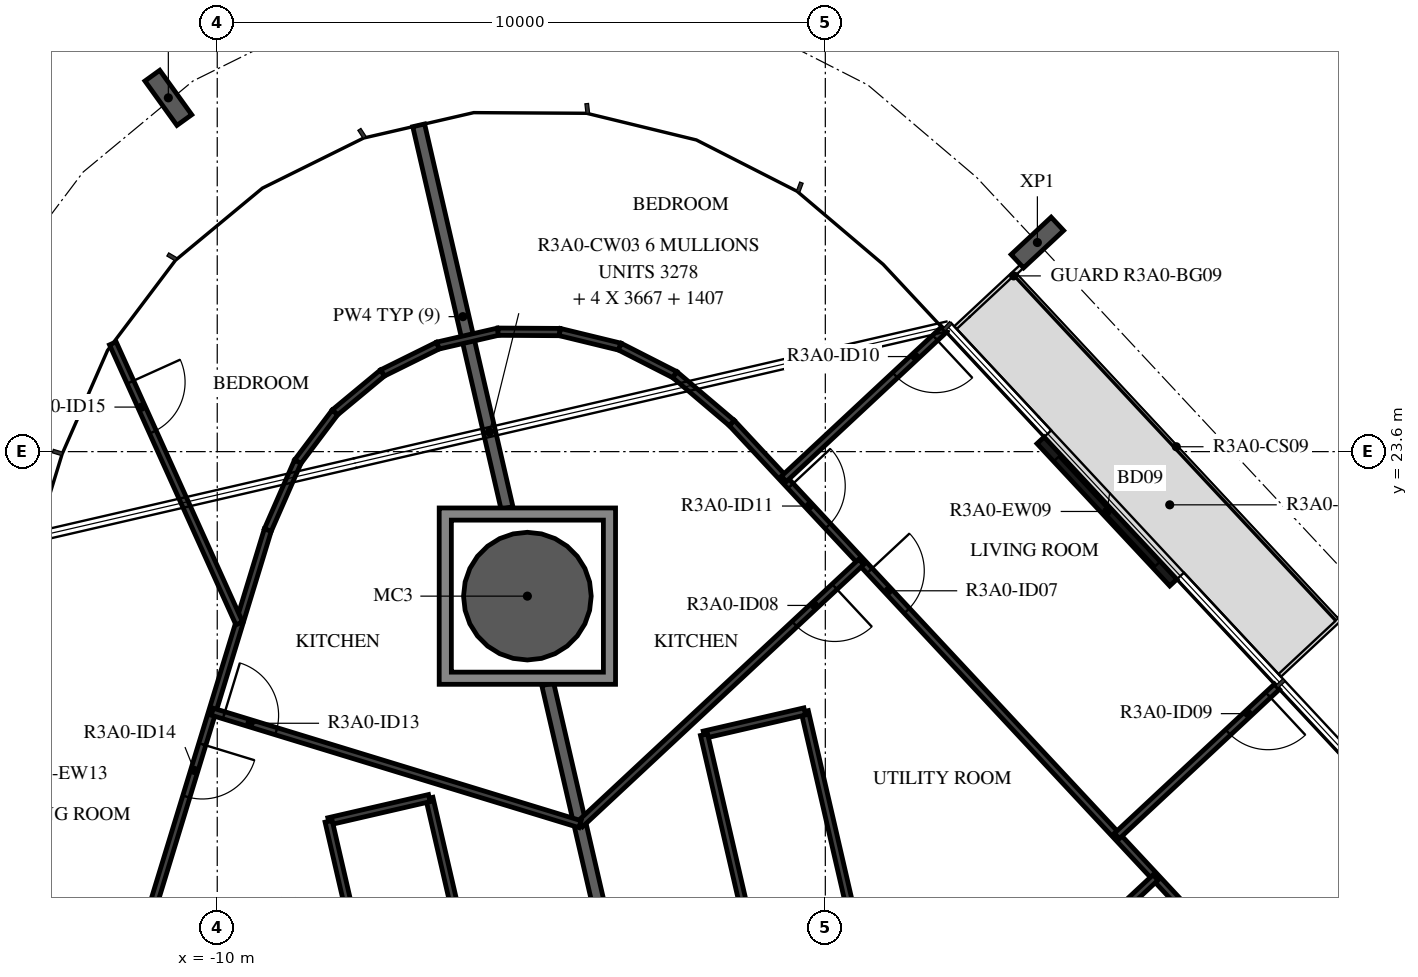
"""IFC4 building model, lengths in metres.
Left out: names, types, materials, properties, quantities, classifications, styles, units other than length and angle.
Written with IfcOpenShell. Run it as: python <this file> out.ifc"""

import sys

from ifc_helpers import new_model, si_unit, direction, frame, frame_2d, origin, origin_2d, place, context, subcontext, project, spatial, polyline, rectangle, hollow_circle, i_section, outline, extrude, element, fill, save


model = new_model("IFC4")
c1 = context("Model", 3, precision=1e-05, world=origin(), true_north=direction((0.0, 1.0)))
c2 = subcontext(c1, "Body", "Model", "MODEL_VIEW")
j1 = project(units=[si_unit("LENGTHUNIT", "METRE"), si_unit("PLANEANGLEUNIT", "RADIAN")], contexts=[c1])
p1 = place(None, origin())
s1 = spatial("IfcSite", under=j1, at=p1, CompositionType="ELEMENT")
p2 = place(p1, origin())
s2 = spatial("IfcBuilding", under=s1, at=p2, CompositionType="ELEMENT")
p3 = place(p2, frame((0.0, 0.0, 120.4)))
s3 = spatial("IfcBuildingStorey", under=s2, at=p3, CompositionType="ELEMENT", Elevation=120.4)
p4 = place(p3, frame((-4.9, 21.223, -0.38), z_axis=(0.0, 0.0, 1.0), x_axis=(1.0, 0.0, 0.0)))
e1 = element("IfcColumn", 1, at=p4, inside=s3, PredefinedType="COLUMN", context=c2, shape_type="SweptSolid", body=[
    extrude(hollow_circle(Radius=1.05, WallThickness=0.05, at=origin_2d()), origin(), (0.0, 0.0, 1.0), 3.5),
])
for number, where, z_axis, x_axis in (
    (2, (3.487, 27.039, -0.38), (0.0, 0.0, 1.0), (0.682, -0.731, 0.0)),
    (3, (-10.804, 29.418, -0.38), (0.0, 0.0, 1.0), (0.811, 0.585, 0.0)),
):
    element("IfcColumn", number, at=place(p3, frame(where, z_axis=z_axis, x_axis=x_axis)), inside=s3, PredefinedType="COLUMN", context=c2, shape_type="SweptSolid", body=[
        extrude(i_section(OverallWidth=0.3, OverallDepth=0.9, WebThickness=0.019, FlangeThickness=0.035, FilletRadius=0.03, at=origin_2d()), origin(), (0.0, 0.0, 1.0), 3.5),
    ])
p5 = place(p3, frame((5.722, 21.446, 0.0), z_axis=(0.0, 0.0, 1.0), x_axis=(-0.681994703002, 0.731357111866, 0.0)))
e4 = element("IfcWall", 4, at=p5, inside=s3, PredefinedType="STANDARD", context=c2, shape_type="SweptSolid", body=[
    extrude(rectangle(XDim=3.2, YDim=0.16, at=frame_2d((1.6, 0.0))), origin(), (0.0, 0.0, 1.0), 3.12),
])
p6 = place(p5, frame((0.4, 0.0, 0.0)))
e5 = element("IfcOpeningElement", 5, at=p6, cuts=e4, PredefinedType="OPENING", context=c2, shape_type="SweptSolid", body=[
    extrude(rectangle(XDim=2.4, YDim=2.4, at=frame_2d((1.2, 1.2))), frame((0.0, 0.09, 0.0), z_axis=(0.0, -1.0, 0.0), x_axis=(1.0, 0.0, 0.0)), (0.0, 0.0, 1.0), 0.18),
])
p7 = place(p3, frame((-4.565, 19.773, 0.0), z_axis=(0.0, 0.0, 1.0), x_axis=(0.224940633072, -0.974372470667, 0.0)))
e6 = element("IfcWall", 6, at=p7, inside=s3, PredefinedType="STANDARD", context=c2, shape_type="SweptSolid", body=[
    extrude(rectangle(XDim=6.594, YDim=0.2, at=frame_2d((3.297, 0.0))), origin(), (0.0, 0.0, 1.0), 3.12),
])
p8 = place(p3, frame((-6.687, 28.966, 0.0), z_axis=(0.0, 0.0, 1.0), x_axis=(0.224945100086, -0.974371439415, 0.0)))
e7 = element("IfcWall", 7, at=p8, inside=s3, PredefinedType="STANDARD", context=c2, shape_type="SweptSolid", body=[
    extrude(rectangle(XDim=6.458, YDim=0.2, at=frame_2d((3.229, 0.0))), origin(), (0.0, 0.0, 1.0), 3.12),
])
p9 = place(p3, frame((0.496, 15.714, 0.0), z_axis=(0.0, 0.0, 1.0), x_axis=(-0.224960478174, 0.974367889075, 0.0)))
e8 = element("IfcWall", 8, at=p9, inside=s3, PredefinedType="PARTITIONING", context=c2, shape_type="SweptSolid", body=[
    extrude(rectangle(XDim=3.708, YDim=0.12, at=frame_2d((1.854, 0.0))), origin(), (0.0, 0.0, 1.0), 3.12),
])
p10 = place(p3, frame((-0.338, 19.328, 0.0), z_axis=(0.0, 0.0, 1.0), x_axis=(-0.974383934081, -0.224890971374, 0.0)))
e9 = element("IfcWall", 9, at=p10, inside=s3, PredefinedType="PARTITIONING", context=c2, shape_type="SweptSolid", body=[
    extrude(rectangle(XDim=1.7, YDim=0.12, at=frame_2d((0.85, 0.0))), origin(), (0.0, 0.0, 1.0), 3.12),
])
p11 = place(p3, frame((-1.995, 18.945, 0.0), z_axis=(0.0, 0.0, 1.0), x_axis=(0.224946048274, -0.974371220514, 0.0)))
e10 = element("IfcWall", 10, at=p11, inside=s3, PredefinedType="PARTITIONING", context=c2, shape_type="SweptSolid", body=[
    extrude(rectangle(XDim=3.708, YDim=0.12, at=frame_2d((1.854, 0.0))), origin(), (0.0, 0.0, 1.0), 3.12),
])
p12 = place(p3, frame((-1.539, 24.071, 0.0), z_axis=(0.0, 0.0, 1.0), x_axis=(0.68200220595, -0.731350115252, 0.0)))
e11 = element("IfcWall", 11, at=p12, inside=s3, PredefinedType="PARTITIONING", context=c2, shape_type="SweptSolid", body=[
    extrude(rectangle(XDim=17.316, YDim=0.12, at=frame_2d((8.658, 0.0))), origin(), (0.0, 0.0, 1.0), 3.12),
])
p13 = place(p12, frame((3.323, 0.0, 0.0)))
e12 = element("IfcOpeningElement", 12, at=p13, cuts=e11, PredefinedType="OPENING", context=c2, shape_type="SweptSolid", body=[
    extrude(rectangle(XDim=0.9, YDim=2.1, at=frame_2d((0.45, 1.05))), frame((0.0, 0.07, 0.0), z_axis=(0.0, -1.0, 0.0), x_axis=(1.0, 0.0, 0.0)), (0.0, 0.0, 1.0), 0.14),
])
p14 = place(p12, frame((1.417, 0.0, 0.0)))
e13 = element("IfcOpeningElement", 13, at=p14, cuts=e11, PredefinedType="OPENING", context=c2, shape_type="SweptSolid", body=[
    extrude(rectangle(XDim=0.9, YDim=2.1, at=frame_2d((0.45, 1.05))), frame((0.0, 0.07, 0.0), z_axis=(0.0, -1.0, 0.0), x_axis=(1.0, 0.0, 0.0)), (0.0, 0.0, 1.0), 0.14),
])
p15 = place(p3, frame((7.427, 19.734, 0.0), z_axis=(0.0, 0.0, 1.0), x_axis=(-0.73139345201, -0.681955730497, 0.0)))
e14 = element("IfcWall", 14, at=p15, inside=s3, PredefinedType="PARTITIONING", context=c2, shape_type="SweptSolid", body=[
    extrude(rectangle(XDim=3.6, YDim=0.12, at=frame_2d((1.8, 0.0))), origin(), (0.0, 0.0, 1.0), 2.73),
])
p16 = place(p15, frame((0.2, 0.0, 0.0)))
e15 = element("IfcOpeningElement", 15, at=p16, cuts=e14, PredefinedType="OPENING", context=c2, shape_type="SweptSolid", body=[
    extrude(rectangle(XDim=0.9, YDim=2.1, at=frame_2d((0.45, 1.05))), frame((0.0, 0.07, 0.0), z_axis=(0.0, -1.0, 0.0), x_axis=(1.0, 0.0, 0.0)), (0.0, 0.0, 1.0), 0.14),
])
p17 = place(p3, frame((5.431, 16.597, 0.0), z_axis=(0.0, 0.0, 1.0), x_axis=(-0.731378807316, -0.681971436505, 0.0)))
e16 = element("IfcWall", 16, at=p17, inside=s3, PredefinedType="PARTITIONING", context=c2, shape_type="SweptSolid", body=[
    extrude(rectangle(XDim=2.609, YDim=0.12, at=frame_2d((1.305, 0.0))), origin(), (0.0, 0.0, 1.0), 3.12),
])
p18 = place(p3, frame((1.951, 25.607, 0.0), z_axis=(0.0, 0.0, 1.0), x_axis=(-0.731328084739, -0.682025829769, 0.0)))
e17 = element("IfcWall", 17, at=p18, inside=s3, PredefinedType="PARTITIONING", context=c2, shape_type="SweptSolid", body=[
    extrude(rectangle(XDim=3.6, YDim=0.12, at=frame_2d((1.8, 0.0))), origin(), (0.0, 0.0, 1.0), 2.73),
])
p19 = place(p18, frame((0.2, 0.0, 0.0)))
e18 = element("IfcOpeningElement", 18, at=p19, cuts=e17, PredefinedType="OPENING", context=c2, shape_type="SweptSolid", body=[
    extrude(rectangle(XDim=0.9, YDim=2.1, at=frame_2d((0.45, 1.05))), frame((0.0, 0.07, 0.0), z_axis=(0.0, -1.0, 0.0), x_axis=(1.0, 0.0, 0.0)), (0.0, 0.0, 1.0), 0.14),
])
p20 = place(p3, frame((0.591, 21.787, 0.0), z_axis=(0.0, 0.0, 1.0), x_axis=(-0.731363296574, -0.681988070588, 0.0)))
e19 = element("IfcWall", 19, at=p20, inside=s3, PredefinedType="PARTITIONING", context=c2, shape_type="SweptSolid", body=[
    extrude(rectangle(XDim=6.324, YDim=0.12, at=frame_2d((3.162, 0.0))), origin(), (0.0, 0.0, 1.0), 3.12),
])
p21 = place(p20, frame((0.6, 0.0, 0.0)))
e20 = element("IfcOpeningElement", 20, at=p21, cuts=e19, PredefinedType="OPENING", context=c2, shape_type="SweptSolid", body=[
    extrude(rectangle(XDim=0.9, YDim=2.1, at=frame_2d((0.45, 1.05))), frame((0.0, 0.07, 0.0), z_axis=(0.0, -1.0, 0.0), x_axis=(1.0, 0.0, 0.0)), (0.0, 0.0, 1.0), 0.14),
])
for number, where, z_axis, x_axis in (
    (21, (-6.372, 25.344, 0.0), (0.0, 0.0, 1.0), (0.974, 0.225, 0.0)),
    (22, (-5.383, 25.572, 0.0), (0.0, 0.0, 1.0), (1.0, -0.006, 0.0)),
):
    element("IfcWall", number, at=place(p3, frame(where, z_axis=z_axis, x_axis=x_axis)), inside=s3, PredefinedType="PARTITIONING", context=c2, shape_type="SweptSolid", body=[
        extrude(rectangle(XDim=1.016, YDim=0.12, at=frame_2d((0.508, 0.0))), origin(), (0.0, 0.0, 1.0), 3.12),
    ])
p22 = place(p3, frame((-4.367, 25.566, 0.0), z_axis=(0.0, 0.0, 1.0), x_axis=(0.971704876381, -0.236198292157, 0.0)))
e23 = element("IfcWall", 23, at=p22, inside=s3, PredefinedType="PARTITIONING", context=c2, shape_type="SweptSolid", body=[
    extrude(rectangle(XDim=1.016, YDim=0.12, at=frame_2d((0.508, 0.0))), origin(), (0.0, 0.0, 1.0), 3.12),
])
p23 = place(p3, frame((-3.379, 25.326, 0.0), z_axis=(0.0, 0.0, 1.0), x_axis=(0.890890892221, -0.454217368842, 0.0)))
e24 = element("IfcWall", 24, at=p23, inside=s3, PredefinedType="PARTITIONING", context=c2, shape_type="SweptSolid", body=[
    extrude(rectangle(XDim=1.016, YDim=0.12, at=frame_2d((0.508, 0.0))), origin(), (0.0, 0.0, 1.0), 3.12),
])
p24 = place(p3, frame((-2.474, 24.865, 0.0), z_axis=(0.0, 0.0, 1.0), x_axis=(0.762351487461, -0.647163201647, 0.0)))
e25 = element("IfcWall", 25, at=p24, inside=s3, PredefinedType="PARTITIONING", context=c2, shape_type="SweptSolid", body=[
    extrude(rectangle(XDim=1.227, YDim=0.12, at=frame_2d((0.614, 0.0))), origin(), (0.0, 0.0, 1.0), 3.12),
])
p25 = place(p3, frame((-5.677, 14.289, 0.0), z_axis=(0.0, 0.0, 1.0), x_axis=(-0.224960478174, 0.974367889075, 0.0)))
e26 = element("IfcWall", 26, at=p25, inside=s3, PredefinedType="PARTITIONING", context=c2, shape_type="SweptSolid", body=[
    extrude(rectangle(XDim=3.708, YDim=0.12, at=frame_2d((1.854, 0.0))), origin(), (0.0, 0.0, 1.0), 3.12),
])
p26 = place(p3, frame((-6.512, 17.902, 0.0), z_axis=(0.0, 0.0, 1.0), x_axis=(-0.974376669418, -0.224922444621, 0.0)))
e27 = element("IfcWall", 27, at=p26, inside=s3, PredefinedType="PARTITIONING", context=c2, shape_type="SweptSolid", body=[
    extrude(rectangle(XDim=1.7, YDim=0.12, at=frame_2d((0.85, 0.0))), origin(), (0.0, 0.0, 1.0), 3.12),
])
p27 = place(p3, frame((-8.168, 17.52, 0.0), z_axis=(0.0, 0.0, 1.0), x_axis=(0.224960478174, -0.974367889075, 0.0)))
e28 = element("IfcWall", 28, at=p27, inside=s3, PredefinedType="PARTITIONING", context=c2, shape_type="SweptSolid", body=[
    extrude(rectangle(XDim=3.708, YDim=0.12, at=frame_2d((1.854, 0.0))), origin(), (0.0, 0.0, 1.0), 3.12),
])
p28 = place(p3, frame((-6.372, 25.344, 0.0), z_axis=(0.0, 0.0, 1.0), x_axis=(-0.896341374877, -0.443364567466, 0.0)))
e29 = element("IfcWall", 29, at=p28, inside=s3, PredefinedType="PARTITIONING", context=c2, shape_type="SweptSolid", body=[
    extrude(rectangle(XDim=1.016, YDim=0.12, at=frame_2d((0.508, 0.0))), origin(), (0.0, 0.0, 1.0), 3.12),
])
p29 = place(p3, frame((-7.283, 24.893, 0.0), z_axis=(0.0, 0.0, 1.0), x_axis=(-0.769657158348, -0.638457405473, 0.0)))
e30 = element("IfcWall", 30, at=p29, inside=s3, PredefinedType="PARTITIONING", context=c2, shape_type="SweptSolid", body=[
    extrude(rectangle(XDim=1.016, YDim=0.12, at=frame_2d((0.508, 0.0))), origin(), (0.0, 0.0, 1.0), 3.12),
])
p30 = place(p3, frame((-8.065, 24.245, 0.0), z_axis=(0.0, 0.0, 1.0), x_axis=(-0.601959070304, -0.798526942363, 0.0)))
e31 = element("IfcWall", 31, at=p30, inside=s3, PredefinedType="PARTITIONING", context=c2, shape_type="SweptSolid", body=[
    extrude(rectangle(XDim=1.016, YDim=0.12, at=frame_2d((0.508, 0.0))), origin(), (0.0, 0.0, 1.0), 3.12),
])
p31 = place(p3, frame((-8.677, 23.433, 0.0), z_axis=(0.0, 0.0, 1.0), x_axis=(-0.401351130635, -0.915924270853, 0.0)))
e32 = element("IfcWall", 32, at=p31, inside=s3, PredefinedType="PARTITIONING", context=c2, shape_type="SweptSolid", body=[
    extrude(rectangle(XDim=1.227, YDim=0.12, at=frame_2d((0.614, 0.0))), origin(), (0.0, 0.0, 1.0), 3.12),
])
p32 = place(p3, frame((-9.169, 22.31, 0.0), z_axis=(0.0, 0.0, 1.0), x_axis=(-0.29236145486, -0.956307889601, 0.0)))
e33 = element("IfcWall", 33, at=p32, inside=s3, PredefinedType="PARTITIONING", context=c2, shape_type="SweptSolid", body=[
    extrude(rectangle(XDim=17.316, YDim=0.12, at=frame_2d((8.658, 0.0))), origin(), (0.0, 0.0, 1.0), 3.12),
])
p33 = place(p32, frame((3.683, 0.0, 0.0)))
e34 = element("IfcOpeningElement", 34, at=p33, cuts=e33, PredefinedType="OPENING", context=c2, shape_type="SweptSolid", body=[
    extrude(rectangle(XDim=0.9, YDim=2.1, at=frame_2d((0.45, 1.05))), frame((0.0, 0.07, 0.0), z_axis=(0.0, -1.0, 0.0), x_axis=(1.0, 0.0, 0.0)), (0.0, 0.0, 1.0), 0.14),
])
p34 = place(p3, frame((-10.082, 19.323, 0.0), z_axis=(0.0, 0.0, 1.0), x_axis=(0.956300011431, -0.292387222936, 0.0)))
e35 = element("IfcWall", 35, at=p34, inside=s3, PredefinedType="PARTITIONING", context=c2, shape_type="SweptSolid", body=[
    extrude(rectangle(XDim=6.324, YDim=0.12, at=frame_2d((3.162, 0.0))), origin(), (0.0, 0.0, 1.0), 3.12),
])
p35 = place(p34, frame((0.2, 0.0, 0.0)))
e36 = element("IfcOpeningElement", 36, at=p35, cuts=e35, PredefinedType="OPENING", context=c2, shape_type="SweptSolid", body=[
    extrude(rectangle(XDim=0.9, YDim=2.1, at=frame_2d((0.45, 1.05))), frame((0.0, 0.07, 0.0), z_axis=(0.0, -1.0, 0.0), x_axis=(1.0, 0.0, 0.0)), (0.0, 0.0, 1.0), 0.14),
])
p36 = place(p3, frame((-11.717, 25.381, 0.0), z_axis=(0.0, 0.0, 1.0), x_axis=(0.411493504767, -0.911412692217, 0.0)))
e37 = element("IfcWall", 37, at=p36, inside=s3, PredefinedType="PARTITIONING", context=c2, shape_type="SweptSolid", body=[
    extrude(rectangle(XDim=5.052, YDim=0.12, at=frame_2d((2.526, 0.0))), origin(), (0.0, 0.0, 1.0), 3.12),
])
p37 = place(p36, frame((0.7, 0.0, 0.0)))
e38 = element("IfcOpeningElement", 38, at=p37, cuts=e37, PredefinedType="OPENING", context=c2, shape_type="SweptSolid", body=[
    extrude(rectangle(XDim=0.9, YDim=2.1, at=frame_2d((0.45, 1.05))), frame((0.0, 0.07, 0.0), z_axis=(0.0, -1.0, 0.0), x_axis=(1.0, 0.0, 0.0)), (0.0, 0.0, 1.0), 0.14),
])
p38 = place(p3, origin())
e39 = element("IfcWall", 39, at=p38, inside=s3, PredefinedType="STANDARD", context=c2, shape_type="SweptSolid", body=[
    extrude(outline(polyline([(-3.45, 22.674), (-3.45, 19.773), (-6.35, 19.773), (-6.35, 22.674), (-3.45, 22.674)]), holes=[polyline([(-6.15, 19.973), (-3.65, 19.973), (-3.65, 22.473), (-6.15, 22.473), (-6.15, 19.973)])]), origin(), (0.0, 0.0, 1.0), 3.12),
])
p39 = place(p6, origin())
e40 = element("IfcDoor", 40, at=p39, inside=s3, OperationType="DOUBLE_DOOR_SLIDING", PredefinedType="DOOR", context=c2, shape_type="SweptSolid", body=[
    extrude(rectangle(XDim=2.4, YDim=2.4, at=frame_2d((1.2, 1.2))), frame((0.0, 0.025, 0.0), z_axis=(0.0, -1.0, 0.0), x_axis=(1.0, 0.0, 0.0)), (0.0, 0.0, 1.0), 0.05),
])
fill(e5, e40)
p40 = place(p13, origin())
e41 = element("IfcDoor", 41, at=p40, inside=s3, OperationType="SINGLE_SWING_RIGHT", PredefinedType="DOOR", context=c2, shape_type="SweptSolid", body=[
    extrude(rectangle(XDim=0.9, YDim=2.1, at=frame_2d((0.45, 1.05))), frame((0.0, 0.025, 0.0), z_axis=(0.0, -1.0, 0.0), x_axis=(1.0, 0.0, 0.0)), (0.0, 0.0, 1.0), 0.05),
])
fill(e12, e41)
p41 = place(p21, origin())
e42 = element("IfcDoor", 42, at=p41, inside=s3, OperationType="SINGLE_SWING_RIGHT", PredefinedType="DOOR", context=c2, shape_type="SweptSolid", body=[
    extrude(rectangle(XDim=0.9, YDim=2.1, at=frame_2d((0.45, 1.05))), frame((0.0, 0.025, 0.0), z_axis=(0.0, -1.0, 0.0), x_axis=(1.0, 0.0, 0.0)), (0.0, 0.0, 1.0), 0.05),
])
fill(e20, e42)
p42 = place(p16, origin())
e43 = element("IfcDoor", 43, at=p42, inside=s3, OperationType="SINGLE_SWING_LEFT", PredefinedType="DOOR", context=c2, shape_type="SweptSolid", body=[
    extrude(rectangle(XDim=0.9, YDim=2.1, at=frame_2d((0.45, 1.05))), frame((0.0, 0.025, 0.0), z_axis=(0.0, -1.0, 0.0), x_axis=(1.0, 0.0, 0.0)), (0.0, 0.0, 1.0), 0.05),
])
fill(e15, e43)
p43 = place(p19, origin())
e44 = element("IfcDoor", 44, at=p43, inside=s3, OperationType="SINGLE_SWING_RIGHT", PredefinedType="DOOR", context=c2, shape_type="SweptSolid", body=[
    extrude(rectangle(XDim=0.9, YDim=2.1, at=frame_2d((0.45, 1.05))), frame((0.0, 0.025, 0.0), z_axis=(0.0, -1.0, 0.0), x_axis=(1.0, 0.0, 0.0)), (0.0, 0.0, 1.0), 0.05),
])
fill(e18, e44)
p44 = place(p14, origin())
e45 = element("IfcDoor", 45, at=p44, inside=s3, OperationType="SINGLE_SWING_LEFT", PredefinedType="DOOR", context=c2, shape_type="SweptSolid", body=[
    extrude(rectangle(XDim=0.9, YDim=2.1, at=frame_2d((0.45, 1.05))), frame((0.0, 0.025, 0.0), z_axis=(0.0, -1.0, 0.0), x_axis=(1.0, 0.0, 0.0)), (0.0, 0.0, 1.0), 0.05),
])
fill(e13, e45)
p45 = place(p35, origin())
e46 = element("IfcDoor", 46, at=p45, inside=s3, OperationType="SINGLE_SWING_LEFT", PredefinedType="DOOR", context=c2, shape_type="SweptSolid", body=[
    extrude(rectangle(XDim=0.9, YDim=2.1, at=frame_2d((0.45, 1.05))), frame((0.0, 0.025, 0.0), z_axis=(0.0, -1.0, 0.0), x_axis=(1.0, 0.0, 0.0)), (0.0, 0.0, 1.0), 0.05),
])
fill(e36, e46)
p46 = place(p33, origin())
e47 = element("IfcDoor", 47, at=p46, inside=s3, OperationType="SINGLE_SWING_LEFT", PredefinedType="DOOR", context=c2, shape_type="SweptSolid", body=[
    extrude(rectangle(XDim=0.9, YDim=2.1, at=frame_2d((0.45, 1.05))), frame((0.0, 0.025, 0.0), z_axis=(0.0, -1.0, 0.0), x_axis=(1.0, 0.0, 0.0)), (0.0, 0.0, 1.0), 0.05),
])
fill(e34, e47)
p47 = place(p37, origin())
e48 = element("IfcDoor", 48, at=p47, inside=s3, OperationType="SINGLE_SWING_LEFT", PredefinedType="DOOR", context=c2, shape_type="SweptSolid", body=[
    extrude(rectangle(XDim=0.9, YDim=2.1, at=frame_2d((0.45, 1.05))), frame((0.0, 0.025, 0.0), z_axis=(0.0, -1.0, 0.0), x_axis=(1.0, 0.0, 0.0)), (0.0, 0.0, 1.0), 0.05),
])
fill(e38, e48)
save(model, sys.argv[1])
